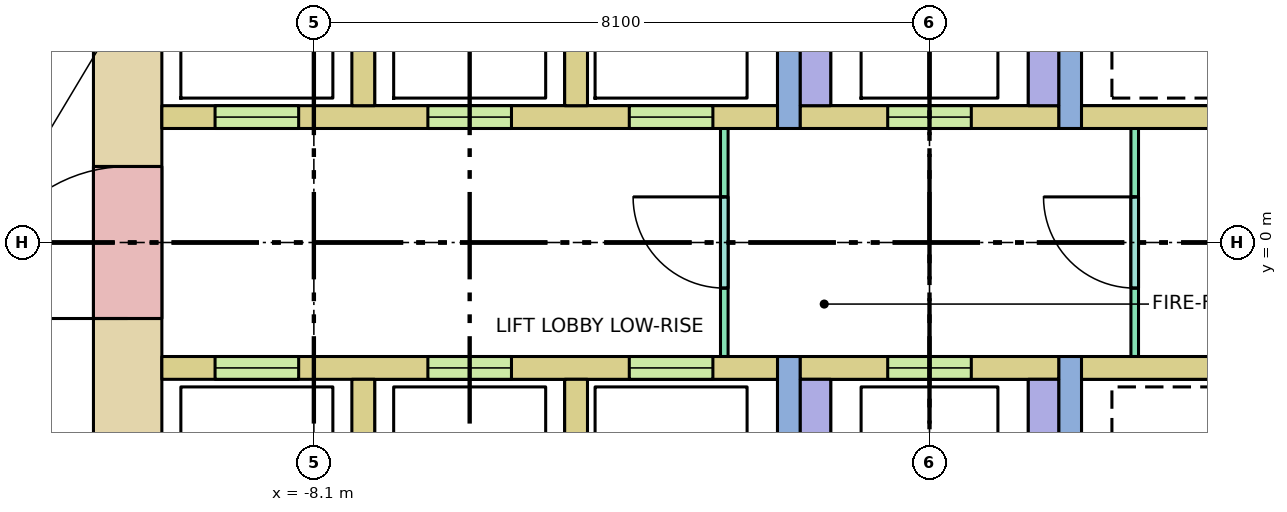
"""IFC4 building model, lengths in metres.
Left out: names, types, materials, properties, quantities, classifications, styles, units other than length and angle.
Written with IfcOpenShell. Run it as: python <this file> out.ifc"""

import sys

from ifc_helpers import new_model, si_unit, direction, frame, frame_2d, origin, place, context, subcontext, project, spatial, rectangle, extrude, element, fill, save


model = new_model("IFC4")
c1 = context("Model", 3, precision=1e-05, world=origin(), true_north=direction((0.0, 1.0)))
c2 = subcontext(c1, "Body", "Model", "MODEL_VIEW")
j1 = project(units=[si_unit("LENGTHUNIT", "METRE"), si_unit("PLANEANGLEUNIT", "RADIAN")], contexts=[c1])
p1 = place(None, origin())
s1 = spatial("IfcSite", under=j1, at=p1, CompositionType="ELEMENT")
p2 = place(p1, origin())
s2 = spatial("IfcBuilding", under=s1, at=p2, CompositionType="ELEMENT")
p3 = place(p2, frame((0.0, 0.0, 71.0)))
s3 = spatial("IfcBuildingStorey", under=s2, at=p3, CompositionType="ELEMENT", Elevation=71.0)
p4 = place(p3, frame((-10.55, -5.13, -0.28), z_axis=(0.0, 0.0, 1.0), x_axis=(0.0, 1.0, 0.0)))
e1 = element("IfcWall", 1, at=p4, inside=s3, PredefinedType="SHEAR", context=c2, shape_type="SweptSolid", body=[
    extrude(rectangle(XDim=10.26, YDim=0.9, at=frame_2d((5.13, 0.0))), origin(), (0.0, 0.0, 1.0), 4.0),
])
p5 = place(p4, frame((4.13, 0.0, 0.28)))
e2 = element("IfcOpeningElement", 2, at=p5, cuts=e1, PredefinedType="OPENING", context=c2, shape_type="SweptSolid", body=[
    extrude(rectangle(XDim=2.0, YDim=2.1, at=frame_2d((1.0, 1.05))), frame((0.0, 0.46, 0.0), z_axis=(0.0, -1.0, 0.0), x_axis=(1.0, 0.0, 0.0)), (0.0, 0.0, 1.0), 0.92),
])
p6 = place(p3, frame((-10.1, 1.65, 0.0), z_axis=(0.0, 0.0, 1.0), x_axis=(1.0, 0.0, 0.0)))
e3 = element("IfcWall", 3, at=p6, inside=s3, PredefinedType="SOLIDWALL", context=c2, shape_type="SweptSolid", body=[
    extrude(rectangle(XDim=8.1, YDim=0.3, at=frame_2d((4.05, 0.0))), origin(), (0.0, 0.0, 1.0), 3.72),
])
p7 = place(p6, frame((0.7, 0.0, 0.0)))
e4 = element("IfcOpeningElement", 4, at=p7, cuts=e3, PredefinedType="OPENING", context=c2, shape_type="SweptSolid", body=[
    extrude(rectangle(XDim=1.1, YDim=2.1, at=frame_2d((0.55, 1.05))), frame((0.0, 0.16, 0.0), z_axis=(0.0, -1.0, 0.0), x_axis=(1.0, 0.0, 0.0)), (0.0, 0.0, 1.0), 0.32),
])
p8 = place(p6, frame((3.5, 0.0, 0.0)))
e5 = element("IfcOpeningElement", 5, at=p8, cuts=e3, PredefinedType="OPENING", context=c2, shape_type="SweptSolid", body=[
    extrude(rectangle(XDim=1.1, YDim=2.1, at=frame_2d((0.55, 1.05))), frame((0.0, 0.16, 0.0), z_axis=(0.0, -1.0, 0.0), x_axis=(1.0, 0.0, 0.0)), (0.0, 0.0, 1.0), 0.32),
])
p9 = place(p6, frame((6.15, 0.0, 0.0)))
e6 = element("IfcOpeningElement", 6, at=p9, cuts=e3, PredefinedType="OPENING", context=c2, shape_type="SweptSolid", body=[
    extrude(rectangle(XDim=1.1, YDim=2.1, at=frame_2d((0.55, 1.05))), frame((0.0, 0.16, 0.0), z_axis=(0.0, -1.0, 0.0), x_axis=(1.0, 0.0, 0.0)), (0.0, 0.0, 1.0), 0.32),
])
p10 = place(p3, frame((-10.1, -1.65, 0.0), z_axis=(0.0, 0.0, 1.0), x_axis=(1.0, 0.0, 0.0)))
e7 = element("IfcWall", 7, at=p10, inside=s3, PredefinedType="SOLIDWALL", context=c2, shape_type="SweptSolid", body=[
    extrude(rectangle(XDim=8.1, YDim=0.3, at=frame_2d((4.05, 0.0))), origin(), (0.0, 0.0, 1.0), 3.72),
])
p11 = place(p10, frame((0.7, 0.0, 0.0)))
e8 = element("IfcOpeningElement", 8, at=p11, cuts=e7, PredefinedType="OPENING", context=c2, shape_type="SweptSolid", body=[
    extrude(rectangle(XDim=1.1, YDim=2.1, at=frame_2d((0.55, 1.05))), frame((0.0, 0.16, 0.0), z_axis=(0.0, -1.0, 0.0), x_axis=(1.0, 0.0, 0.0)), (0.0, 0.0, 1.0), 0.32),
])
p12 = place(p10, frame((3.5, 0.0, 0.0)))
e9 = element("IfcOpeningElement", 9, at=p12, cuts=e7, PredefinedType="OPENING", context=c2, shape_type="SweptSolid", body=[
    extrude(rectangle(XDim=1.1, YDim=2.1, at=frame_2d((0.55, 1.05))), frame((0.0, 0.16, 0.0), z_axis=(0.0, -1.0, 0.0), x_axis=(1.0, 0.0, 0.0)), (0.0, 0.0, 1.0), 0.32),
])
p13 = place(p10, frame((6.15, 0.0, 0.0)))
e10 = element("IfcOpeningElement", 10, at=p13, cuts=e7, PredefinedType="OPENING", context=c2, shape_type="SweptSolid", body=[
    extrude(rectangle(XDim=1.1, YDim=2.1, at=frame_2d((0.55, 1.05))), frame((0.0, 0.16, 0.0), z_axis=(0.0, -1.0, 0.0), x_axis=(1.0, 0.0, 0.0)), (0.0, 0.0, 1.0), 0.32),
])
for number, where, z_axis, x_axis in (
    (11, (2.0, 1.65, 0.0), (0.0, 0.0, 1.0), (1.0, 0.0, 0.0)),
    (12, (2.0, -1.65, 0.0), (0.0, 0.0, 1.0), (1.0, 0.0, 0.0)),
):
    element("IfcWall", number, at=place(p3, frame(where, z_axis=z_axis, x_axis=x_axis)), inside=s3, PredefinedType="SOLIDWALL", context=c2, shape_type="SweptSolid", body=[
        extrude(rectangle(XDim=8.1, YDim=0.3, at=frame_2d((4.05, 0.0))), origin(), (0.0, 0.0, 1.0), 3.72),
    ])
for number, where, z_axis, x_axis in (
    (13, (-7.45, 1.8, 0.0), (0.0, 0.0, 1.0), (0.0, 1.0, 0.0)),
    (14, (-7.45, -4.2, 0.0), (0.0, 0.0, 1.0), (0.0, 1.0, 0.0)),
    (15, (-4.65, 1.8, 0.0), (0.0, 0.0, 1.0), (0.0, 1.0, 0.0)),
    (16, (-4.65, -4.2, 0.0), (0.0, 0.0, 1.0), (0.0, 1.0, 0.0)),
):
    element("IfcWall", number, at=place(p3, frame(where, z_axis=z_axis, x_axis=x_axis)), inside=s3, PredefinedType="SOLIDWALL", context=c2, shape_type="SweptSolid", body=[
        extrude(rectangle(XDim=2.4, YDim=0.3, at=frame_2d((1.2, 0.0))), origin(), (0.0, 0.0, 1.0), 3.72),
    ])
for number, where, z_axis, x_axis in (
    (17, (-1.85, 1.5, 0.0), (0.0, 0.0, 1.0), (0.0, 1.0, 0.0)),
    (18, (-1.85, -8.1, 0.0), (0.0, 0.0, 1.0), (0.0, 1.0, 0.0)),
    (19, (1.85, 1.5, 0.0), (0.0, 0.0, 1.0), (0.0, 1.0, 0.0)),
    (20, (1.85, -8.1, 0.0), (0.0, 0.0, 1.0), (0.0, 1.0, 0.0)),
):
    element("IfcWall", number, at=place(p3, frame(where, z_axis=z_axis, x_axis=x_axis)), inside=s3, PredefinedType="SHEAR", context=c2, shape_type="SweptSolid", body=[
        extrude(rectangle(XDim=6.6, YDim=0.3, at=frame_2d((3.3, 0.0))), origin(), (0.0, 0.0, 1.0), 3.72),
    ])
p14 = place(p3, frame((-1.7, 1.65, 0.0), z_axis=(0.0, 0.0, 1.0), x_axis=(1.0, 0.0, 0.0)))
e21 = element("IfcWall", 21, at=p14, inside=s3, PredefinedType="SOLIDWALL", context=c2, shape_type="SweptSolid", body=[
    extrude(rectangle(XDim=3.4, YDim=0.3, at=frame_2d((1.7, 0.0))), origin(), (0.0, 0.0, 1.0), 3.72),
])
p15 = place(p14, frame((1.15, 0.0, 0.0)))
e22 = element("IfcOpeningElement", 22, at=p15, cuts=e21, PredefinedType="OPENING", context=c2, shape_type="SweptSolid", body=[
    extrude(rectangle(XDim=1.1, YDim=2.1, at=frame_2d((0.55, 1.05))), frame((0.0, 0.16, 0.0), z_axis=(0.0, -1.0, 0.0), x_axis=(1.0, 0.0, 0.0)), (0.0, 0.0, 1.0), 0.32),
])
p16 = place(p3, frame((-1.7, -1.65, 0.0), z_axis=(0.0, 0.0, 1.0), x_axis=(1.0, 0.0, 0.0)))
e23 = element("IfcWall", 23, at=p16, inside=s3, PredefinedType="SOLIDWALL", context=c2, shape_type="SweptSolid", body=[
    extrude(rectangle(XDim=3.4, YDim=0.3, at=frame_2d((1.7, 0.0))), origin(), (0.0, 0.0, 1.0), 3.72),
])
p17 = place(p16, frame((1.15, 0.0, 0.0)))
e24 = element("IfcOpeningElement", 24, at=p17, cuts=e23, PredefinedType="OPENING", context=c2, shape_type="SweptSolid", body=[
    extrude(rectangle(XDim=1.1, YDim=2.1, at=frame_2d((0.55, 1.05))), frame((0.0, 0.16, 0.0), z_axis=(0.0, -1.0, 0.0), x_axis=(1.0, 0.0, 0.0)), (0.0, 0.0, 1.0), 0.32),
])
for number, where, z_axis, x_axis in (
    (25, (-1.5, 1.8, 0.0), (0.0, 0.0, 1.0), (0.0, 1.0, 0.0)),
    (26, (-1.5, -4.8, 0.0), (0.0, 0.0, 1.0), (0.0, 1.0, 0.0)),
    (27, (1.5, 1.8, 0.0), (0.0, 0.0, 1.0), (0.0, 1.0, 0.0)),
    (28, (1.5, -4.8, 0.0), (0.0, 0.0, 1.0), (0.0, 1.0, 0.0)),
):
    element("IfcWall", number, at=place(p3, frame(where, z_axis=z_axis, x_axis=x_axis)), inside=s3, PredefinedType="SOLIDWALL", context=c2, shape_type="SweptSolid", body=[
        extrude(rectangle(XDim=3.0, YDim=0.4, at=frame_2d((1.5, 0.0))), origin(), (0.0, 0.0, 1.0), 3.72),
    ])
p18 = place(p3, frame((-2.7, -1.5, 0.0), z_axis=(0.0, 0.0, 1.0), x_axis=(0.0, 1.0, 0.0)))
e29 = element("IfcWall", 29, at=p18, inside=s3, PredefinedType="PARTITIONING", context=c2, shape_type="SweptSolid", body=[
    extrude(rectangle(XDim=3.0, YDim=0.1, at=frame_2d((1.5, 0.0))), origin(), (0.0, 0.0, 1.0), 3.72),
])
p19 = place(p18, frame((0.9, 0.0, 0.0)))
e30 = element("IfcOpeningElement", 30, at=p19, cuts=e29, PredefinedType="OPENING", context=c2, shape_type="SweptSolid", body=[
    extrude(rectangle(XDim=1.2, YDim=2.1, at=frame_2d((0.6, 1.05))), frame((0.0, 0.06, 0.0), z_axis=(0.0, -1.0, 0.0), x_axis=(1.0, 0.0, 0.0)), (0.0, 0.0, 1.0), 0.12),
])
p20 = place(p3, frame((2.7, -1.5, 0.0), z_axis=(0.0, 0.0, 1.0), x_axis=(0.0, 1.0, 0.0)))
e31 = element("IfcWall", 31, at=p20, inside=s3, PredefinedType="PARTITIONING", context=c2, shape_type="SweptSolid", body=[
    extrude(rectangle(XDim=3.0, YDim=0.1, at=frame_2d((1.5, 0.0))), origin(), (0.0, 0.0, 1.0), 3.72),
])
p21 = place(p20, frame((0.9, 0.0, 0.0)))
e32 = element("IfcOpeningElement", 32, at=p21, cuts=e31, PredefinedType="OPENING", context=c2, shape_type="SweptSolid", body=[
    extrude(rectangle(XDim=1.2, YDim=2.1, at=frame_2d((0.6, 1.05))), frame((0.0, 0.06, 0.0), z_axis=(0.0, -1.0, 0.0), x_axis=(1.0, 0.0, 0.0)), (0.0, 0.0, 1.0), 0.12),
])
p22 = place(p7, origin())
e33 = element("IfcDoor", 33, at=p22, inside=s3, OperationType="DOUBLE_DOOR_SLIDING", PredefinedType="DOOR", context=c2, shape_type="SweptSolid", body=[
    extrude(rectangle(XDim=1.1, YDim=2.1, at=frame_2d((0.55, 1.05))), frame((0.0, 0.025, 0.0), z_axis=(0.0, -1.0, 0.0), x_axis=(1.0, 0.0, 0.0)), (0.0, 0.0, 1.0), 0.05),
])
fill(e4, e33)
p23 = place(p8, origin())
e34 = element("IfcDoor", 34, at=p23, inside=s3, OperationType="DOUBLE_DOOR_SLIDING", PredefinedType="DOOR", context=c2, shape_type="SweptSolid", body=[
    extrude(rectangle(XDim=1.1, YDim=2.1, at=frame_2d((0.55, 1.05))), frame((0.0, 0.025, 0.0), z_axis=(0.0, -1.0, 0.0), x_axis=(1.0, 0.0, 0.0)), (0.0, 0.0, 1.0), 0.05),
])
fill(e5, e34)
p24 = place(p9, origin())
e35 = element("IfcDoor", 35, at=p24, inside=s3, OperationType="DOUBLE_DOOR_SLIDING", PredefinedType="DOOR", context=c2, shape_type="SweptSolid", body=[
    extrude(rectangle(XDim=1.1, YDim=2.1, at=frame_2d((0.55, 1.05))), frame((0.0, 0.025, 0.0), z_axis=(0.0, -1.0, 0.0), x_axis=(1.0, 0.0, 0.0)), (0.0, 0.0, 1.0), 0.05),
])
fill(e6, e35)
p25 = place(p11, origin())
e36 = element("IfcDoor", 36, at=p25, inside=s3, OperationType="DOUBLE_DOOR_SLIDING", PredefinedType="DOOR", context=c2, shape_type="SweptSolid", body=[
    extrude(rectangle(XDim=1.1, YDim=2.1, at=frame_2d((0.55, 1.05))), frame((0.0, 0.025, 0.0), z_axis=(0.0, -1.0, 0.0), x_axis=(1.0, 0.0, 0.0)), (0.0, 0.0, 1.0), 0.05),
])
fill(e8, e36)
p26 = place(p12, origin())
e37 = element("IfcDoor", 37, at=p26, inside=s3, OperationType="DOUBLE_DOOR_SLIDING", PredefinedType="DOOR", context=c2, shape_type="SweptSolid", body=[
    extrude(rectangle(XDim=1.1, YDim=2.1, at=frame_2d((0.55, 1.05))), frame((0.0, 0.025, 0.0), z_axis=(0.0, -1.0, 0.0), x_axis=(1.0, 0.0, 0.0)), (0.0, 0.0, 1.0), 0.05),
])
fill(e9, e37)
p27 = place(p13, origin())
e38 = element("IfcDoor", 38, at=p27, inside=s3, OperationType="DOUBLE_DOOR_SLIDING", PredefinedType="DOOR", context=c2, shape_type="SweptSolid", body=[
    extrude(rectangle(XDim=1.1, YDim=2.1, at=frame_2d((0.55, 1.05))), frame((0.0, 0.025, 0.0), z_axis=(0.0, -1.0, 0.0), x_axis=(1.0, 0.0, 0.0)), (0.0, 0.0, 1.0), 0.05),
])
fill(e10, e38)
p28 = place(p15, origin())
e39 = element("IfcDoor", 39, at=p28, inside=s3, OperationType="DOUBLE_DOOR_SLIDING", PredefinedType="DOOR", context=c2, shape_type="SweptSolid", body=[
    extrude(rectangle(XDim=1.1, YDim=2.1, at=frame_2d((0.55, 1.05))), frame((0.0, 0.025, 0.0), z_axis=(0.0, -1.0, 0.0), x_axis=(1.0, 0.0, 0.0)), (0.0, 0.0, 1.0), 0.05),
])
fill(e22, e39)
p29 = place(p17, origin())
e40 = element("IfcDoor", 40, at=p29, inside=s3, OperationType="DOUBLE_DOOR_SLIDING", PredefinedType="DOOR", context=c2, shape_type="SweptSolid", body=[
    extrude(rectangle(XDim=1.1, YDim=2.1, at=frame_2d((0.55, 1.05))), frame((0.0, 0.025, 0.0), z_axis=(0.0, -1.0, 0.0), x_axis=(1.0, 0.0, 0.0)), (0.0, 0.0, 1.0), 0.05),
])
fill(e24, e40)
p30 = place(p5, origin())
e41 = element("IfcDoor", 41, at=p30, inside=s3, OperationType="DOUBLE_DOOR_SINGLE_SWING", PredefinedType="DOOR", context=c2, shape_type="SweptSolid", body=[
    extrude(rectangle(XDim=2.0, YDim=2.1, at=frame_2d((1.0, 1.05))), frame((0.0, 0.025, 0.0), z_axis=(0.0, -1.0, 0.0), x_axis=(1.0, 0.0, 0.0)), (0.0, 0.0, 1.0), 0.05),
])
fill(e2, e41)
p31 = place(p19, origin())
e42 = element("IfcDoor", 42, at=p31, inside=s3, OperationType="SINGLE_SWING_RIGHT", PredefinedType="DOOR", context=c2, shape_type="SweptSolid", body=[
    extrude(rectangle(XDim=1.2, YDim=2.1, at=frame_2d((0.6, 1.05))), frame((0.0, 0.025, 0.0), z_axis=(0.0, -1.0, 0.0), x_axis=(1.0, 0.0, 0.0)), (0.0, 0.0, 1.0), 0.05),
])
fill(e30, e42)
p32 = place(p21, origin())
e43 = element("IfcDoor", 43, at=p32, inside=s3, OperationType="SINGLE_SWING_RIGHT", PredefinedType="DOOR", context=c2, shape_type="SweptSolid", body=[
    extrude(rectangle(XDim=1.2, YDim=2.1, at=frame_2d((0.6, 1.05))), frame((0.0, 0.025, 0.0), z_axis=(0.0, -1.0, 0.0), x_axis=(1.0, 0.0, 0.0)), (0.0, 0.0, 1.0), 0.05),
])
fill(e32, e43)
save(model, sys.argv[1])
